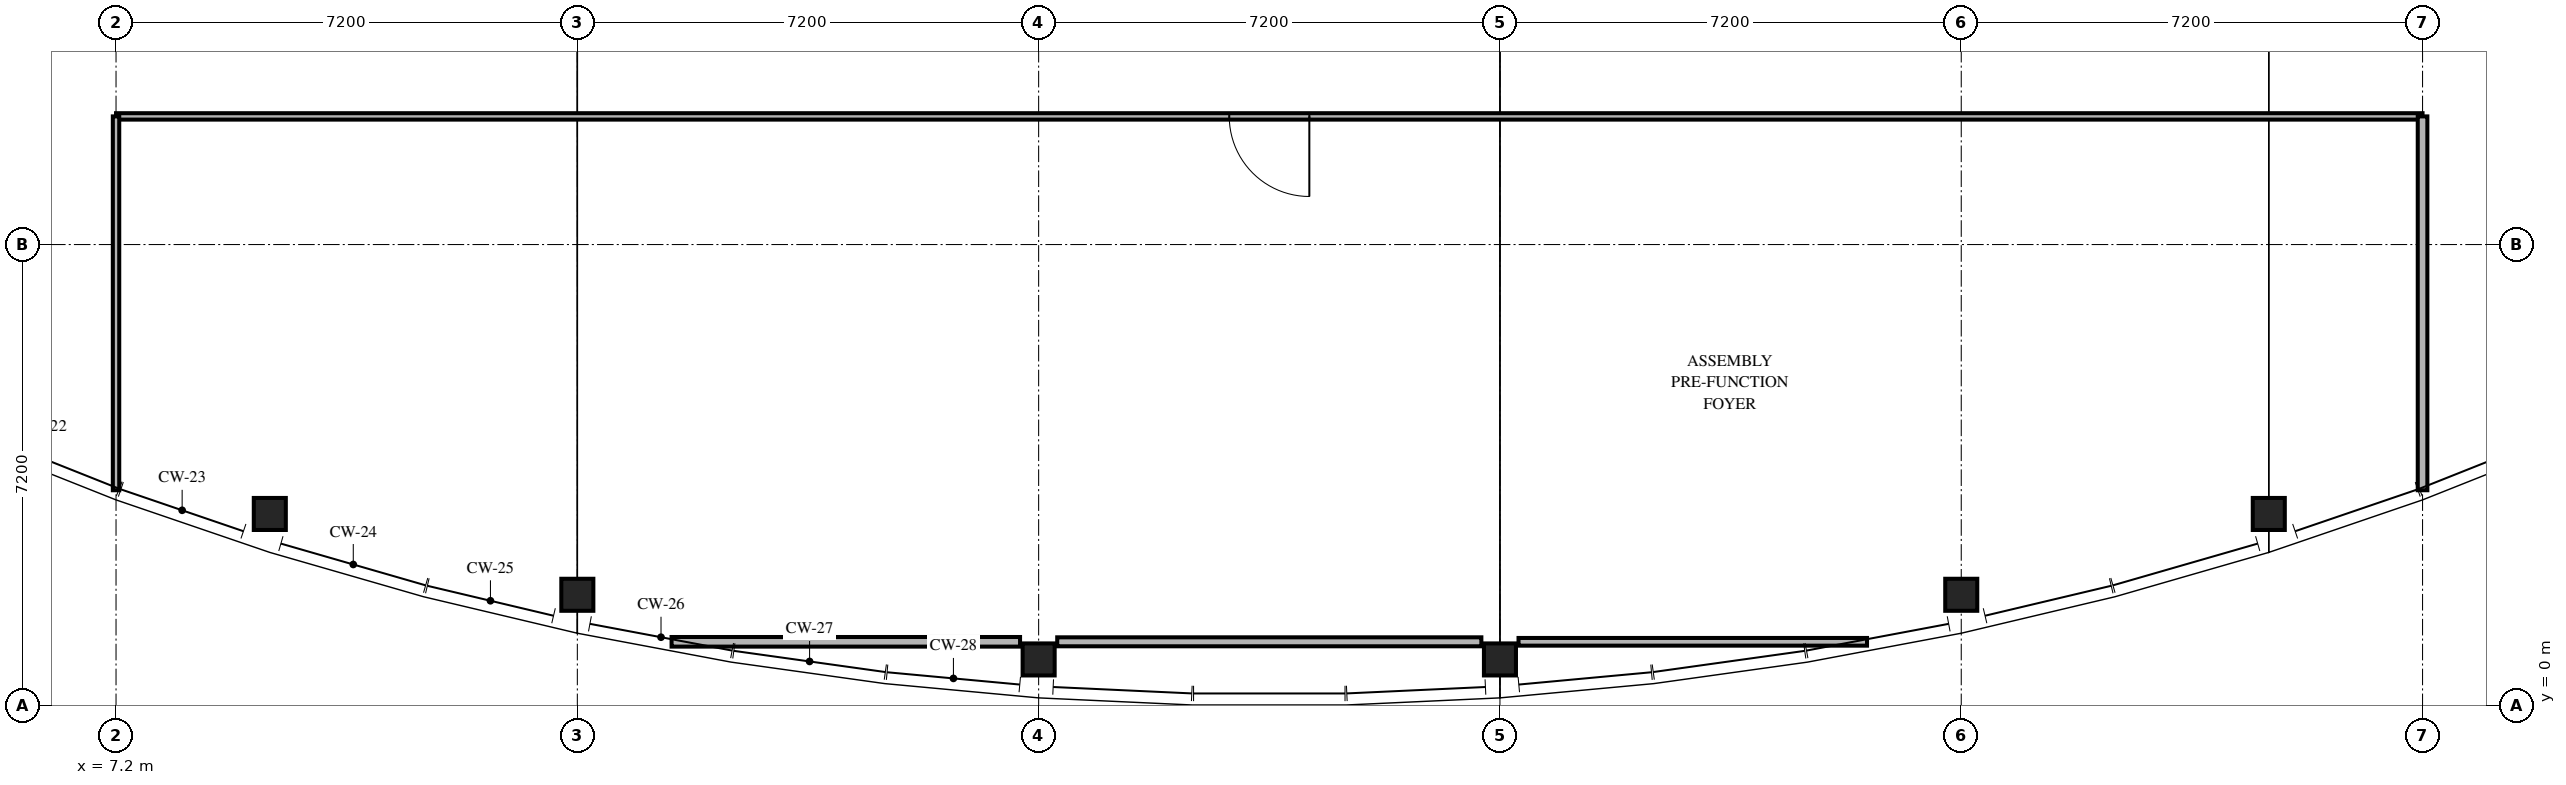
"""IFC4 building model, lengths in metres.
Left out: names, types, materials, properties, quantities, classifications, styles, units other than length and angle.
Written with IfcOpenShell. Run it as: python <this file> out.ifc"""

import sys

from ifc_helpers import new_model, si_unit, direction, frame, frame_2d, origin, origin_2d, place, context, subcontext, project, spatial, rectangle, circle, extrude, element, fill, save


model = new_model("IFC4")
c1 = context("Model", 3, precision=1e-05, world=origin(), true_north=direction((0.0, 1.0)))
c2 = subcontext(c1, "Body", "Model", "MODEL_VIEW")
j1 = project(units=[si_unit("LENGTHUNIT", "METRE"), si_unit("PLANEANGLEUNIT", "RADIAN")], contexts=[c1])
p1 = place(None, origin())
s1 = spatial("IfcSite", under=j1, at=p1, CompositionType="ELEMENT")
p2 = place(p1, origin())
s2 = spatial("IfcBuilding", under=s1, at=p2, CompositionType="ELEMENT")
p3 = place(p2, frame((0.0, 0.0, 4.5)))
s3 = spatial("IfcBuildingStorey", under=s2, at=p3, CompositionType="ELEMENT", Elevation=4.5)
for number, where, z_axis, x_axis in (
    (1, (9.6, 2.995, 0.0), (0.0, 0.0, 1.0), (1.0, 0.0, 0.0)),
    (2, (14.4, 1.734, 0.0), (0.0, 0.0, 1.0), (1.0, 0.0, 0.0)),
    (3, (21.6, 0.725, 0.0), (0.0, 0.0, 1.0), (1.0, 0.0, 0.0)),
    (4, (28.8, 0.725, 0.0), (0.0, 0.0, 1.0), (1.0, 0.0, 0.0)),
    (5, (36.0, 1.734, 0.0), (0.0, 0.0, 1.0), (1.0, 0.0, 0.0)),
    (6, (40.8, 2.995, 0.0), (0.0, 0.0, 1.0), (1.0, 0.0, 0.0)),
):
    element("IfcColumn", number, at=place(p3, frame(where, z_axis=z_axis, x_axis=x_axis)), inside=s3, PredefinedType="COLUMN", context=c2, shape_type="SweptSolid", body=[
        extrude(circle(Radius=0.25, at=origin_2d()), origin(), (0.0, 0.0, 1.0), 4.2),
    ])
p4 = place(p3, frame((43.2, 9.2, 0.0), z_axis=(0.0, 0.0, 1.0), x_axis=(-1.0, 0.0, 0.0)))
e7 = element("IfcWall", 7, at=p4, inside=s3, PredefinedType="PARTITIONING", context=c2, shape_type="SweptSolid", body=[
    extrude(rectangle(XDim=36.0, YDim=0.1, at=frame_2d((18.0, 0.0))), origin(), (0.0, 0.0, 1.0), 3.95),
])
p5 = place(p4, frame((17.375, 0.0, 0.0)))
e8 = element("IfcOpeningElement", 8, at=p5, cuts=e7, PredefinedType="OPENING", context=c2, shape_type="SweptSolid", body=[
    extrude(rectangle(XDim=1.25, YDim=2.2, at=frame_2d((0.625, 1.1))), frame((0.0, 0.06, 0.0), z_axis=(0.0, -1.0, 0.0), x_axis=(1.0, 0.0, 0.0)), (0.0, 0.0, 1.0), 0.12),
])
p6 = place(p3, frame((15.871, 1.0, 0.0), z_axis=(0.0, 0.0, 1.0), x_axis=(1.0, 0.0, 0.0)))
e9 = element("IfcWall", 9, at=p6, inside=s3, PredefinedType="PARTITIONING", context=c2, shape_type="SweptSolid", body=[
    extrude(rectangle(XDim=5.439, YDim=0.15, at=frame_2d((2.72, 0.0))), origin(), (0.0, 0.0, 1.0), 3.35),
])
p7 = place(p3, frame((21.89, 1.0, 0.0), z_axis=(0.0, 0.0, 1.0), x_axis=(1.0, 0.0, 0.0)))
e10 = element("IfcWall", 10, at=p7, inside=s3, PredefinedType="PARTITIONING", context=c2, shape_type="SweptSolid", body=[
    extrude(rectangle(XDim=6.62, YDim=0.14, at=frame_2d((3.31, 0.0))), origin(), (0.0, 0.0, 1.0), 3.2),
])
p8 = place(p3, frame((29.09, 1.0, 0.0), z_axis=(0.0, 0.0, 1.0), x_axis=(1.0, 0.0, 0.0)))
e11 = element("IfcWall", 11, at=p8, inside=s3, PredefinedType="PARTITIONING", context=c2, shape_type="SweptSolid", body=[
    extrude(rectangle(XDim=5.439, YDim=0.12, at=frame_2d((2.72, 0.0))), origin(), (0.0, 0.0, 1.0), 3.35),
])
p9 = place(p3, frame((7.2, 9.2, 0.0), z_axis=(0.0, 0.0, 1.0), x_axis=(0.0, -1.0, 0.0)))
e12 = element("IfcWall", 12, at=p9, inside=s3, PredefinedType="PARTITIONING", context=c2, shape_type="SweptSolid", body=[
    extrude(rectangle(XDim=5.834, YDim=0.1, at=frame_2d((2.917, 0.0))), origin(), (0.0, 0.0, 1.0), 3.35),
])
p10 = place(p3, frame((43.2, 3.365, 0.0), z_axis=(0.0, 0.0, 1.0), x_axis=(0.0, 1.0, 0.0)))
e13 = element("IfcWall", 13, at=p10, inside=s3, PredefinedType="PARTITIONING", context=c2, shape_type="SweptSolid", body=[
    extrude(rectangle(XDim=5.834, YDim=0.15, at=frame_2d((2.917, 0.0))), origin(), (0.0, 0.0, 1.0), 3.35),
])
p11 = place(p5, origin())
e14 = element("IfcDoor", 14, at=p11, inside=s3, OperationType="SINGLE_SWING_LEFT", PredefinedType="DOOR", context=c2, shape_type="SweptSolid", body=[
    extrude(rectangle(XDim=1.25, YDim=2.2, at=frame_2d((0.625, 1.1))), frame((0.0, 0.025, 0.0), z_axis=(0.0, -1.0, 0.0), x_axis=(1.0, 0.0, 0.0)), (0.0, 0.0, 1.0), 0.05),
])
fill(e8, e14)
save(model, sys.argv[1])
